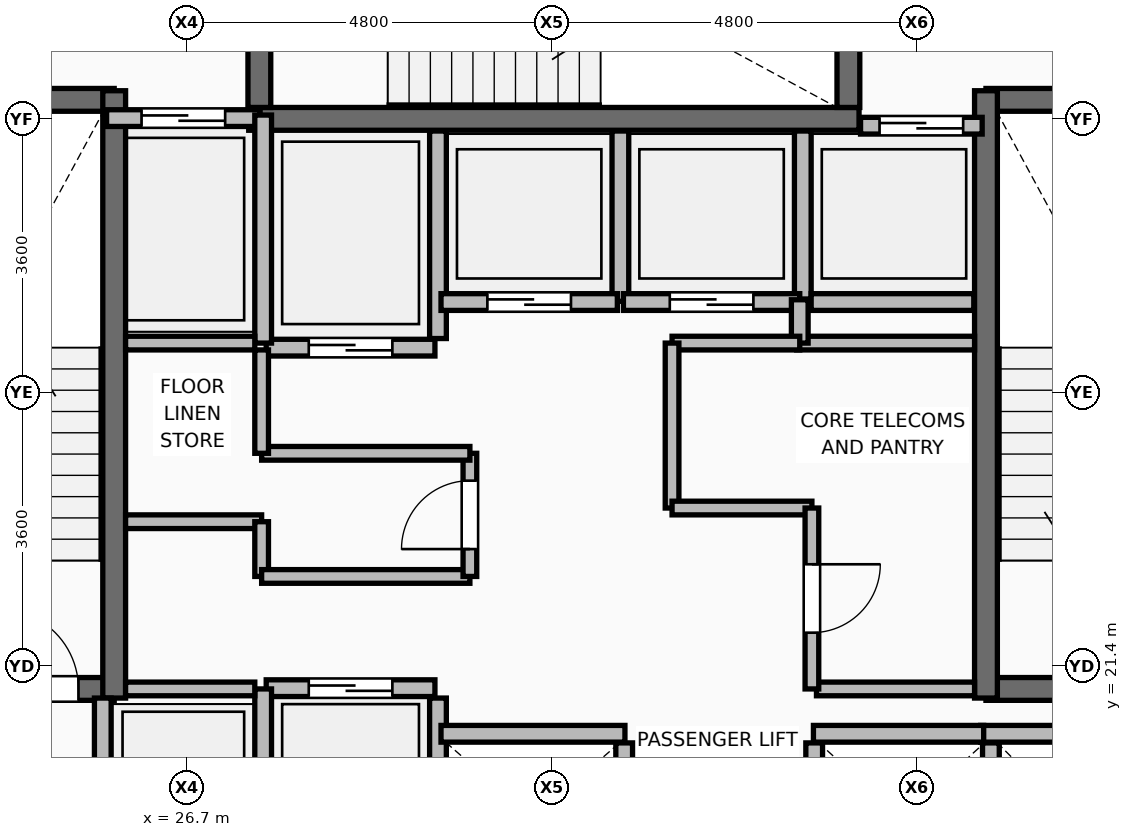
"""IFC4 building model, lengths in metres.
Left out: names, types, materials, properties, quantities, classifications, styles, units other than length and angle.
Written with IfcOpenShell. Run it as: python <this file> out.ifc"""

import sys

from ifc_helpers import new_model, si_unit, direction, frame, frame_2d, origin, place, context, subcontext, project, spatial, rectangle, extrude, element, fill, save


model = new_model("IFC4")
c1 = context("Model", 3, precision=1e-05, world=origin(), true_north=direction((0.0, 1.0)))
c2 = subcontext(c1, "Body", "Model", "MODEL_VIEW")
j1 = project(units=[si_unit("LENGTHUNIT", "METRE"), si_unit("PLANEANGLEUNIT", "RADIAN")], contexts=[c1])
p1 = place(None, origin())
s1 = spatial("IfcSite", under=j1, at=p1, CompositionType="ELEMENT")
p2 = place(p1, origin())
s2 = spatial("IfcBuilding", under=s1, at=p2, CompositionType="ELEMENT")
p3 = place(p2, frame((0.0, 0.0, 278.85)))
s3 = spatial("IfcBuildingStorey", under=s2, at=p3, CompositionType="ELEMENT", Elevation=278.85)
p4 = place(p3, frame((30.0, 18.08, 0.0), z_axis=(0.0, 0.0, 1.0), x_axis=(0.0, 1.0, 0.0)))
e1 = element("IfcWall", 1, at=p4, inside=s3, PredefinedType="PARTITIONING", context=c2, shape_type="SweptSolid", body=[
    extrude(rectangle(XDim=2.9, YDim=0.22, at=frame_2d((1.45, 0.0))), origin(), (0.0, 0.0, 1.0), 3.545),
])
for number, where, z_axis, x_axis in (
    (2, (32.45, 17.92, 0.0), (0.0, 0.0, 1.0), (0.0, 1.0, 0.0)),
    (3, (34.95, 17.92, 0.0), (0.0, 0.0, 1.0), (0.0, 1.0, 0.0)),
):
    element("IfcWall", number, at=place(p3, frame(where, z_axis=z_axis, x_axis=x_axis)), inside=s3, PredefinedType="PARTITIONING", context=c2, shape_type="SweptSolid", body=[
        extrude(rectangle(XDim=2.47, YDim=0.22, at=frame_2d((1.235, 0.0))), origin(), (0.0, 0.0, 1.0), 3.545),
    ])
p5 = place(p3, frame((37.275, 18.08, 0.0), z_axis=(0.0, 0.0, 1.0), x_axis=(0.0, 1.0, 0.0)))
e4 = element("IfcWall", 4, at=p5, inside=s3, PredefinedType="PARTITIONING", context=c2, shape_type="SweptSolid", body=[
    extrude(rectangle(XDim=2.31, YDim=0.22, at=frame_2d((1.155, 0.0))), origin(), (0.0, 0.0, 1.0), 3.545),
])
p6 = place(p3, frame((30.0, 25.71, 0.0), z_axis=(0.0, 0.0, 1.0), x_axis=(0.0, 1.0, 0.0)))
e5 = element("IfcWall", 5, at=p6, inside=s3, PredefinedType="PARTITIONING", context=c2, shape_type="SweptSolid", body=[
    extrude(rectangle(XDim=2.73, YDim=0.22, at=frame_2d((1.365, 0.0))), origin(), (0.0, 0.0, 1.0), 3.545),
])
p7 = place(p3, frame((32.4, 26.2, 0.0), z_axis=(0.0, 0.0, 1.0), x_axis=(0.0, 1.0, 0.0)))
e6 = element("IfcWall", 6, at=p7, inside=s3, PredefinedType="PARTITIONING", context=c2, shape_type="SweptSolid", body=[
    extrude(rectangle(XDim=2.24, YDim=0.22, at=frame_2d((1.12, 0.0))), origin(), (0.0, 0.0, 1.0), 3.545),
])
p8 = place(p3, frame((34.8, 26.23, 0.0), z_axis=(0.0, 0.0, 1.0), x_axis=(0.0, 1.0, 0.0)))
e7 = element("IfcWall", 7, at=p8, inside=s3, PredefinedType="PARTITIONING", context=c2, shape_type="SweptSolid", body=[
    extrude(rectangle(XDim=2.21, YDim=0.22, at=frame_2d((1.105, 0.0))), origin(), (0.0, 0.0, 1.0), 3.545),
])
p9 = place(p3, frame((34.91, 26.19, 0.0), z_axis=(0.0, 0.0, 1.0), x_axis=(1.0, 0.0, 0.0)))
e8 = element("IfcWall", 8, at=p9, inside=s3, PredefinedType="PARTITIONING", context=c2, shape_type="SweptSolid", body=[
    extrude(rectangle(XDim=2.14, YDim=0.22, at=frame_2d((1.07, 0.0))), origin(), (0.0, 0.0, 1.0), 3.545),
])
p10 = place(p3, frame((22.075, 21.1, 0.0), z_axis=(0.0, 0.0, 1.0), x_axis=(1.0, 0.0, 0.0)))
e9 = element("IfcWall", 9, at=p10, inside=s3, PredefinedType="SHEAR", context=c2, shape_type="SweptSolid", body=[
    extrude(rectangle(XDim=3.665, YDim=0.3, at=frame_2d((1.833, 0.0))), origin(), (0.0, 0.0, 1.0), 3.57),
])
p11 = place(p10, frame((2.145, 0.0, 0.0)))
e10 = element("IfcOpeningElement", 10, at=p11, cuts=e9, PredefinedType="OPENING", context=c2, shape_type="SweptSolid", body=[
    extrude(rectangle(XDim=1.05, YDim=2.1, at=frame_2d((0.525, 1.05))), frame((0.0, 0.16, 0.0), z_axis=(0.0, -1.0, 0.0), x_axis=(1.0, 0.0, 0.0)), (0.0, 0.0, 1.0), 0.32),
])
p12 = place(p3, frame((22.075, 28.85, 0.0), z_axis=(0.0, 0.0, 1.0), x_axis=(1.0, 0.0, 0.0)))
e11 = element("IfcWall", 11, at=p12, inside=s3, PredefinedType="SHEAR", context=c2, shape_type="SweptSolid", body=[
    extrude(rectangle(XDim=3.665, YDim=0.3, at=frame_2d((1.833, 0.0))), origin(), (0.0, 0.0, 1.0), 3.57),
])
p13 = place(p3, frame((25.74, 20.98, 0.0), z_axis=(0.0, 0.0, 1.0), x_axis=(0.0, 1.0, 0.0)))
e12 = element("IfcWall", 12, at=p13, inside=s3, PredefinedType="SHEAR", context=c2, shape_type="SweptSolid", body=[
    extrude(rectangle(XDim=7.99, YDim=0.3, at=frame_2d((3.995, 0.0))), origin(), (0.0, 0.0, 1.0), 3.57),
])
for number, where, z_axis, x_axis in (
    (13, (37.21, 21.1, 0.0), (0.0, 0.0, 1.0), (1.0, 0.0, 0.0)),
    (14, (37.21, 28.85, 0.0), (0.0, 0.0, 1.0), (1.0, 0.0, 0.0)),
):
    element("IfcWall", number, at=place(p3, frame(where, z_axis=z_axis, x_axis=x_axis)), inside=s3, PredefinedType="SHEAR", context=c2, shape_type="SweptSolid", body=[
        extrude(rectangle(XDim=3.715, YDim=0.3, at=frame_2d((1.857, 0.0))), origin(), (0.0, 0.0, 1.0), 3.57),
    ])
p14 = place(p3, frame((37.21, 20.98, 0.0), z_axis=(0.0, 0.0, 1.0), x_axis=(0.0, 1.0, 0.0)))
e15 = element("IfcWall", 15, at=p14, inside=s3, PredefinedType="SHEAR", context=c2, shape_type="SweptSolid", body=[
    extrude(rectangle(XDim=7.99, YDim=0.3, at=frame_2d((3.995, 0.0))), origin(), (0.0, 0.0, 1.0), 3.57),
])
p15 = place(p3, frame((27.51, 28.6, 0.0), z_axis=(0.0, 0.0, 1.0), x_axis=(1.0, 0.0, 0.0)))
e16 = element("IfcWall", 16, at=p15, inside=s3, PredefinedType="SHEAR", context=c2, shape_type="SweptSolid", body=[
    extrude(rectangle(XDim=8.03, YDim=0.3, at=frame_2d((4.015, 0.0))), origin(), (0.0, 0.0, 1.0), 3.57),
])
p16 = place(p3, frame((27.65, 28.75, 0.0), z_axis=(0.0, 0.0, 1.0), x_axis=(0.0, 1.0, 0.0)))
e17 = element("IfcWall", 17, at=p16, inside=s3, PredefinedType="SHEAR", context=c2, shape_type="SweptSolid", body=[
    extrude(rectangle(XDim=3.525, YDim=0.3, at=frame_2d((1.762, 0.0))), origin(), (0.0, 0.0, 1.0), 3.57),
])
p17 = place(p16, frame((1.0, 0.0, 0.0)))
e18 = element("IfcOpeningElement", 18, at=p17, cuts=e17, PredefinedType="OPENING", context=c2, shape_type="SweptSolid", body=[
    extrude(rectangle(XDim=1.05, YDim=2.1, at=frame_2d((0.525, 1.05))), frame((0.0, 0.16, 0.0), z_axis=(0.0, -1.0, 0.0), x_axis=(1.0, 0.0, 0.0)), (0.0, 0.0, 1.0), 0.32),
])
p18 = place(p3, frame((35.4, 28.75, 0.0), z_axis=(0.0, 0.0, 1.0), x_axis=(0.0, 1.0, 0.0)))
e19 = element("IfcWall", 19, at=p18, inside=s3, PredefinedType="SHEAR", context=c2, shape_type="SweptSolid", body=[
    extrude(rectangle(XDim=3.525, YDim=0.3, at=frame_2d((1.762, 0.0))), origin(), (0.0, 0.0, 1.0), 3.57),
])
p19 = place(p3, frame((25.59, 18.22, 0.0), z_axis=(0.0, 0.0, 1.0), x_axis=(0.0, 1.0, 0.0)))
e20 = element("IfcWall", 20, at=p19, inside=s3, PredefinedType="PARTITIONING", context=c2, shape_type="SweptSolid", body=[
    extrude(rectangle(XDim=2.76, YDim=0.22, at=frame_2d((1.38, 0.0))), origin(), (0.0, 0.0, 1.0), 3.55),
])
p20 = place(p19, frame((0.83, 0.0, 0.0)))
e21 = element("IfcOpeningElement", 21, at=p20, cuts=e20, PredefinedType="OPENING", context=c2, shape_type="SweptSolid", body=[
    extrude(rectangle(XDim=1.1, YDim=2.2, at=frame_2d((0.55, 1.1))), frame((0.0, 0.12, 0.0), z_axis=(0.0, -1.0, 0.0), x_axis=(1.0, 0.0, 0.0)), (0.0, 0.0, 1.0), 0.24),
])
p21 = place(p3, frame((25.64, 28.61, 0.0), z_axis=(0.0, 0.0, 1.0), x_axis=(1.0, 0.0, 0.0)))
e22 = element("IfcWall", 22, at=p21, inside=s3, PredefinedType="PARTITIONING", context=c2, shape_type="SweptSolid", body=[
    extrude(rectangle(XDim=2.02, YDim=0.22, at=frame_2d((1.01, 0.0))), origin(), (0.0, 0.0, 1.0), 3.55),
])
p22 = place(p21, frame((0.46, 0.0, 0.0)))
e23 = element("IfcOpeningElement", 23, at=p22, cuts=e22, PredefinedType="OPENING", context=c2, shape_type="SweptSolid", body=[
    extrude(rectangle(XDim=1.1, YDim=2.2, at=frame_2d((0.55, 1.1))), frame((0.0, 0.12, 0.0), z_axis=(0.0, -1.0, 0.0), x_axis=(1.0, 0.0, 0.0)), (0.0, 0.0, 1.0), 0.24),
])
p23 = place(p3, frame((27.74, 21.11, 0.0), z_axis=(0.0, 0.0, 1.0), x_axis=(1.0, 0.0, 0.0)))
e24 = element("IfcWall", 24, at=p23, inside=s3, PredefinedType="PARTITIONING", context=c2, shape_type="SweptSolid", body=[
    extrude(rectangle(XDim=2.22, YDim=0.22, at=frame_2d((1.11, 0.0))), origin(), (0.0, 0.0, 1.0), 3.55),
])
p24 = place(p23, frame((0.56, 0.0, 0.0)))
e25 = element("IfcOpeningElement", 25, at=p24, cuts=e24, PredefinedType="OPENING", context=c2, shape_type="SweptSolid", body=[
    extrude(rectangle(XDim=1.1, YDim=2.2, at=frame_2d((0.55, 1.1))), frame((0.0, 0.12, 0.0), z_axis=(0.0, -1.0, 0.0), x_axis=(1.0, 0.0, 0.0)), (0.0, 0.0, 1.0), 0.24),
])
p25 = place(p3, frame((27.74, 25.59, 0.0), z_axis=(0.0, 0.0, 1.0), x_axis=(1.0, 0.0, 0.0)))
e26 = element("IfcWall", 26, at=p25, inside=s3, PredefinedType="PARTITIONING", context=c2, shape_type="SweptSolid", body=[
    extrude(rectangle(XDim=2.22, YDim=0.22, at=frame_2d((1.11, 0.0))), origin(), (0.0, 0.0, 1.0), 3.55),
])
p26 = place(p25, frame((0.56, 0.0, 0.0)))
e27 = element("IfcOpeningElement", 27, at=p26, cuts=e26, PredefinedType="OPENING", context=c2, shape_type="SweptSolid", body=[
    extrude(rectangle(XDim=1.1, YDim=2.2, at=frame_2d((0.55, 1.1))), frame((0.0, 0.12, 0.0), z_axis=(0.0, -1.0, 0.0), x_axis=(1.0, 0.0, 0.0)), (0.0, 0.0, 1.0), 0.24),
])
p27 = place(p3, frame((30.04, 20.51, 0.0), z_axis=(0.0, 0.0, 1.0), x_axis=(1.0, 0.0, 0.0)))
e28 = element("IfcWall", 28, at=p27, inside=s3, PredefinedType="PARTITIONING", context=c2, shape_type="SweptSolid", body=[
    extrude(rectangle(XDim=2.42, YDim=0.22, at=frame_2d((1.21, 0.0))), origin(), (0.0, 0.0, 1.0), 3.55),
])
for number, where, z_axis, x_axis in (
    (29, (37.14, 20.51, 0.0), (0.0, 0.0, 1.0), (1.0, 0.0, 0.0)),
    (30, (34.94, 20.51, 0.0), (0.0, 0.0, 1.0), (1.0, 0.0, 0.0)),
):
    element("IfcWall", number, at=place(p3, frame(where, z_axis=z_axis, x_axis=x_axis)), inside=s3, PredefinedType="PARTITIONING", context=c2, shape_type="SweptSolid", body=[
        extrude(rectangle(XDim=2.24, YDim=0.22, at=frame_2d((1.12, 0.0))), origin(), (0.0, 0.0, 1.0), 3.55),
    ])
p28 = place(p3, frame((30.04, 26.19, 0.0), z_axis=(0.0, 0.0, 1.0), x_axis=(1.0, 0.0, 0.0)))
e31 = element("IfcWall", 31, at=p28, inside=s3, PredefinedType="PARTITIONING", context=c2, shape_type="SweptSolid", body=[
    extrude(rectangle(XDim=2.32, YDim=0.22, at=frame_2d((1.16, 0.0))), origin(), (0.0, 0.0, 1.0), 3.55),
])
p29 = place(p28, frame((0.61, 0.0, 0.0)))
e32 = element("IfcOpeningElement", 32, at=p29, cuts=e31, PredefinedType="OPENING", context=c2, shape_type="SweptSolid", body=[
    extrude(rectangle(XDim=1.1, YDim=2.2, at=frame_2d((0.55, 1.1))), frame((0.0, 0.12, 0.0), z_axis=(0.0, -1.0, 0.0), x_axis=(1.0, 0.0, 0.0)), (0.0, 0.0, 1.0), 0.24),
])
p30 = place(p3, frame((32.44, 26.19, 0.0), z_axis=(0.0, 0.0, 1.0), x_axis=(1.0, 0.0, 0.0)))
e33 = element("IfcWall", 33, at=p30, inside=s3, PredefinedType="PARTITIONING", context=c2, shape_type="SweptSolid", body=[
    extrude(rectangle(XDim=2.32, YDim=0.22, at=frame_2d((1.16, 0.0))), origin(), (0.0, 0.0, 1.0), 3.55),
])
p31 = place(p30, frame((0.61, 0.0, 0.0)))
e34 = element("IfcOpeningElement", 34, at=p31, cuts=e33, PredefinedType="OPENING", context=c2, shape_type="SweptSolid", body=[
    extrude(rectangle(XDim=1.1, YDim=2.2, at=frame_2d((0.55, 1.1))), frame((0.0, 0.12, 0.0), z_axis=(0.0, -1.0, 0.0), x_axis=(1.0, 0.0, 0.0)), (0.0, 0.0, 1.0), 0.24),
])
p32 = place(p3, frame((35.56, 28.51, 0.0), z_axis=(0.0, 0.0, 1.0), x_axis=(1.0, 0.0, 0.0)))
e35 = element("IfcWall", 35, at=p32, inside=s3, PredefinedType="PARTITIONING", context=c2, shape_type="SweptSolid", body=[
    extrude(rectangle(XDim=1.6, YDim=0.22, at=frame_2d((0.8, 0.0))), origin(), (0.0, 0.0, 1.0), 3.55),
])
p33 = place(p32, frame((0.25, 0.0, 0.0)))
e36 = element("IfcOpeningElement", 36, at=p33, cuts=e35, PredefinedType="OPENING", context=c2, shape_type="SweptSolid", body=[
    extrude(rectangle(XDim=1.1, YDim=2.2, at=frame_2d((0.55, 1.1))), frame((0.0, 0.12, 0.0), z_axis=(0.0, -1.0, 0.0), x_axis=(1.0, 0.0, 0.0)), (0.0, 0.0, 1.0), 0.24),
])
p34 = place(p3, frame((27.7, 18.15, 0.0), z_axis=(0.0, 0.0, 1.0), x_axis=(0.0, 1.0, 0.0)))
e37 = element("IfcWall", 37, at=p34, inside=s3, PredefinedType="PARTITIONING", context=c2, shape_type="SweptSolid", body=[
    extrude(rectangle(XDim=2.95, YDim=0.22, at=frame_2d((1.475, 0.0))), origin(), (0.0, 0.0, 1.0), 3.55),
])
p35 = place(p3, frame((27.7, 25.65, 0.0), z_axis=(0.0, 0.0, 1.0), x_axis=(0.0, 1.0, 0.0)))
e38 = element("IfcWall", 38, at=p35, inside=s3, PredefinedType="PARTITIONING", context=c2, shape_type="SweptSolid", body=[
    extrude(rectangle(XDim=3.0, YDim=0.22, at=frame_2d((1.5, 0.0))), origin(), (0.0, 0.0, 1.0), 3.55),
])
for number, where, z_axis, x_axis in (
    (39, (25.89, 21.1, 0.0), (0.0, 0.0, 1.0), (1.0, 0.0, 0.0)),
    (40, (25.89, 25.65, 0.0), (0.0, 0.0, 1.0), (1.0, 0.0, 0.0)),
):
    element("IfcWall", number, at=place(p3, frame(where, z_axis=z_axis, x_axis=x_axis)), inside=s3, PredefinedType="PARTITIONING", context=c2, shape_type="SweptSolid", body=[
        extrude(rectangle(XDim=1.7, YDim=0.18, at=frame_2d((0.85, 0.0))), origin(), (0.0, 0.0, 1.0), 3.55),
    ])
p36 = place(p3, frame((25.89, 23.3, 0.0), z_axis=(0.0, 0.0, 1.0), x_axis=(1.0, 0.0, 0.0)))
e41 = element("IfcWall", 41, at=p36, inside=s3, PredefinedType="PARTITIONING", context=c2, shape_type="SweptSolid", body=[
    extrude(rectangle(XDim=1.79, YDim=0.18, at=frame_2d((0.895, 0.0))), origin(), (0.0, 0.0, 1.0), 3.55),
])
p37 = place(p3, frame((27.68, 22.58, 0.0), z_axis=(0.0, 0.0, 1.0), x_axis=(0.0, 1.0, 0.0)))
e42 = element("IfcWall", 42, at=p37, inside=s3, PredefinedType="PARTITIONING", context=c2, shape_type="SweptSolid", body=[
    extrude(rectangle(XDim=0.72, YDim=0.18, at=frame_2d((0.36, 0.0))), origin(), (0.0, 0.0, 1.0), 3.55),
])
p38 = place(p3, frame((27.68, 22.58, 0.0), z_axis=(0.0, 0.0, 1.0), x_axis=(1.0, 0.0, 0.0)))
e43 = element("IfcWall", 43, at=p38, inside=s3, PredefinedType="PARTITIONING", context=c2, shape_type="SweptSolid", body=[
    extrude(rectangle(XDim=2.74, YDim=0.18, at=frame_2d((1.37, 0.0))), origin(), (0.0, 0.0, 1.0), 3.55),
])
p39 = place(p3, frame((30.42, 22.58, 0.0), z_axis=(0.0, 0.0, 1.0), x_axis=(0.0, 1.0, 0.0)))
e44 = element("IfcWall", 44, at=p39, inside=s3, PredefinedType="PARTITIONING", context=c2, shape_type="SweptSolid", body=[
    extrude(rectangle(XDim=1.62, YDim=0.18, at=frame_2d((0.81, 0.0))), origin(), (0.0, 0.0, 1.0), 3.55),
])
p40 = place(p39, frame((0.36, 0.0, 0.0)))
e45 = element("IfcOpeningElement", 45, at=p40, cuts=e44, PredefinedType="OPENING", context=c2, shape_type="SweptSolid", body=[
    extrude(rectangle(XDim=0.9, YDim=2.1, at=frame_2d((0.45, 1.05))), frame((0.0, 0.1, 0.0), z_axis=(0.0, -1.0, 0.0), x_axis=(1.0, 0.0, 0.0)), (0.0, 0.0, 1.0), 0.2),
])
p41 = place(p3, frame((27.68, 24.2, 0.0), z_axis=(0.0, 0.0, 1.0), x_axis=(1.0, 0.0, 0.0)))
e46 = element("IfcWall", 46, at=p41, inside=s3, PredefinedType="PARTITIONING", context=c2, shape_type="SweptSolid", body=[
    extrude(rectangle(XDim=2.74, YDim=0.18, at=frame_2d((1.37, 0.0))), origin(), (0.0, 0.0, 1.0), 3.55),
])
p42 = place(p3, frame((27.68, 24.2, 0.0), z_axis=(0.0, 0.0, 1.0), x_axis=(0.0, 1.0, 0.0)))
e47 = element("IfcWall", 47, at=p42, inside=s3, PredefinedType="PARTITIONING", context=c2, shape_type="SweptSolid", body=[
    extrude(rectangle(XDim=1.36, YDim=0.18, at=frame_2d((0.68, 0.0))), origin(), (0.0, 0.0, 1.0), 3.55),
])
p43 = place(p3, frame((34.98, 21.1, 0.0), z_axis=(0.0, 0.0, 1.0), x_axis=(1.0, 0.0, 0.0)))
e48 = element("IfcWall", 48, at=p43, inside=s3, PredefinedType="PARTITIONING", context=c2, shape_type="SweptSolid", body=[
    extrude(rectangle(XDim=2.08, YDim=0.18, at=frame_2d((1.04, 0.0))), origin(), (0.0, 0.0, 1.0), 3.55),
])
p44 = place(p3, frame((34.72, 25.65, 0.0), z_axis=(0.0, 0.0, 1.0), x_axis=(1.0, 0.0, 0.0)))
e49 = element("IfcWall", 49, at=p44, inside=s3, PredefinedType="PARTITIONING", context=c2, shape_type="SweptSolid", body=[
    extrude(rectangle(XDim=2.34, YDim=0.18, at=frame_2d((1.17, 0.0))), origin(), (0.0, 0.0, 1.0), 3.55),
])
p45 = place(p3, frame((34.76, 25.65, 0.0), z_axis=(0.0, 0.0, 1.0), x_axis=(0.0, 1.0, 0.0)))
e50 = element("IfcWall", 50, at=p45, inside=s3, PredefinedType="PARTITIONING", context=c2, shape_type="SweptSolid", body=[
    extrude(rectangle(XDim=0.57, YDim=0.22, at=frame_2d((0.285, 0.0))), origin(), (0.0, 0.0, 1.0), 3.55),
])
p46 = place(p3, frame((33.08, 25.65, 0.0), z_axis=(0.0, 0.0, 1.0), x_axis=(1.0, 0.0, 0.0)))
e51 = element("IfcWall", 51, at=p46, inside=s3, PredefinedType="PARTITIONING", context=c2, shape_type="SweptSolid", body=[
    extrude(rectangle(XDim=1.68, YDim=0.18, at=frame_2d((0.84, 0.0))), origin(), (0.0, 0.0, 1.0), 3.55),
])
p47 = place(p3, frame((33.08, 23.48, 0.0), z_axis=(0.0, 0.0, 1.0), x_axis=(0.0, 1.0, 0.0)))
e52 = element("IfcWall", 52, at=p47, inside=s3, PredefinedType="PARTITIONING", context=c2, shape_type="SweptSolid", body=[
    extrude(rectangle(XDim=2.17, YDim=0.18, at=frame_2d((1.085, 0.0))), origin(), (0.0, 0.0, 1.0), 3.55),
])
p48 = place(p3, frame((33.08, 23.48, 0.0), z_axis=(0.0, 0.0, 1.0), x_axis=(1.0, 0.0, 0.0)))
e53 = element("IfcWall", 53, at=p48, inside=s3, PredefinedType="PARTITIONING", context=c2, shape_type="SweptSolid", body=[
    extrude(rectangle(XDim=1.84, YDim=0.18, at=frame_2d((0.92, 0.0))), origin(), (0.0, 0.0, 1.0), 3.55),
])
p49 = place(p3, frame((34.92, 21.1, 0.0), z_axis=(0.0, 0.0, 1.0), x_axis=(0.0, 1.0, 0.0)))
e54 = element("IfcWall", 54, at=p49, inside=s3, PredefinedType="PARTITIONING", context=c2, shape_type="SweptSolid", body=[
    extrude(rectangle(XDim=2.38, YDim=0.18, at=frame_2d((1.19, 0.0))), origin(), (0.0, 0.0, 1.0), 3.55),
])
p50 = place(p49, frame((0.74, 0.0, 0.0)))
e55 = element("IfcOpeningElement", 55, at=p50, cuts=e54, PredefinedType="OPENING", context=c2, shape_type="SweptSolid", body=[
    extrude(rectangle(XDim=0.9, YDim=2.1, at=frame_2d((0.45, 1.05))), frame((0.0, 0.1, 0.0), z_axis=(0.0, -1.0, 0.0), x_axis=(1.0, 0.0, 0.0)), (0.0, 0.0, 1.0), 0.2),
])
p51 = place(p11, origin())
e56 = element("IfcDoor", 56, at=p51, inside=s3, OperationType="SINGLE_SWING_LEFT", PredefinedType="DOOR", context=c2, shape_type="SweptSolid", body=[
    extrude(rectangle(XDim=1.05, YDim=2.1, at=frame_2d((0.525, 1.05))), frame((0.0, 0.025, 0.0), z_axis=(0.0, -1.0, 0.0), x_axis=(1.0, 0.0, 0.0)), (0.0, 0.0, 1.0), 0.05),
])
fill(e10, e56)
p52 = place(p22, origin())
e57 = element("IfcDoor", 57, at=p52, inside=s3, OperationType="DOUBLE_DOOR_SLIDING", PredefinedType="DOOR", context=c2, shape_type="SweptSolid", body=[
    extrude(rectangle(XDim=1.1, YDim=2.2, at=frame_2d((0.55, 1.1))), frame((0.0, 0.025, 0.0), z_axis=(0.0, -1.0, 0.0), x_axis=(1.0, 0.0, 0.0)), (0.0, 0.0, 1.0), 0.05),
])
fill(e23, e57)
p53 = place(p24, origin())
e58 = element("IfcDoor", 58, at=p53, inside=s3, OperationType="DOUBLE_DOOR_SLIDING", PredefinedType="DOOR", context=c2, shape_type="SweptSolid", body=[
    extrude(rectangle(XDim=1.1, YDim=2.2, at=frame_2d((0.55, 1.1))), frame((0.0, 0.025, 0.0), z_axis=(0.0, -1.0, 0.0), x_axis=(1.0, 0.0, 0.0)), (0.0, 0.0, 1.0), 0.05),
])
fill(e25, e58)
p54 = place(p26, frame((1.1, 0.0, 0.0), z_axis=(0.0, 0.0, 1.0), x_axis=(-1.0, 0.0, 0.0)))
e59 = element("IfcDoor", 59, at=p54, inside=s3, OperationType="DOUBLE_DOOR_SLIDING", PredefinedType="DOOR", context=c2, shape_type="SweptSolid", body=[
    extrude(rectangle(XDim=1.1, YDim=2.2, at=frame_2d((0.55, 1.1))), frame((0.0, 0.025, 0.0), z_axis=(0.0, -1.0, 0.0), x_axis=(1.0, 0.0, 0.0)), (0.0, 0.0, 1.0), 0.05),
])
fill(e27, e59)
p55 = place(p29, frame((1.1, 0.0, 0.0), z_axis=(0.0, 0.0, 1.0), x_axis=(-1.0, 0.0, 0.0)))
e60 = element("IfcDoor", 60, at=p55, inside=s3, OperationType="DOUBLE_DOOR_SLIDING", PredefinedType="DOOR", context=c2, shape_type="SweptSolid", body=[
    extrude(rectangle(XDim=1.1, YDim=2.2, at=frame_2d((0.55, 1.1))), frame((0.0, 0.025, 0.0), z_axis=(0.0, -1.0, 0.0), x_axis=(1.0, 0.0, 0.0)), (0.0, 0.0, 1.0), 0.05),
])
fill(e32, e60)
p56 = place(p31, frame((1.1, 0.0, 0.0), z_axis=(0.0, 0.0, 1.0), x_axis=(-1.0, 0.0, 0.0)))
e61 = element("IfcDoor", 61, at=p56, inside=s3, OperationType="DOUBLE_DOOR_SLIDING", PredefinedType="DOOR", context=c2, shape_type="SweptSolid", body=[
    extrude(rectangle(XDim=1.1, YDim=2.2, at=frame_2d((0.55, 1.1))), frame((0.0, 0.025, 0.0), z_axis=(0.0, -1.0, 0.0), x_axis=(1.0, 0.0, 0.0)), (0.0, 0.0, 1.0), 0.05),
])
fill(e34, e61)
p57 = place(p33, origin())
e62 = element("IfcDoor", 62, at=p57, inside=s3, OperationType="DOUBLE_DOOR_SLIDING", PredefinedType="DOOR", context=c2, shape_type="SweptSolid", body=[
    extrude(rectangle(XDim=1.1, YDim=2.2, at=frame_2d((0.55, 1.1))), frame((0.0, 0.025, 0.0), z_axis=(0.0, -1.0, 0.0), x_axis=(1.0, 0.0, 0.0)), (0.0, 0.0, 1.0), 0.05),
])
fill(e36, e62)
p58 = place(p40, origin())
e63 = element("IfcDoor", 63, at=p58, inside=s3, OperationType="SINGLE_SWING_LEFT", PredefinedType="DOOR", context=c2, shape_type="SweptSolid", body=[
    extrude(rectangle(XDim=0.9, YDim=2.1, at=frame_2d((0.45, 1.05))), frame((0.0, 0.025, 0.0), z_axis=(0.0, -1.0, 0.0), x_axis=(1.0, 0.0, 0.0)), (0.0, 0.0, 1.0), 0.05),
])
fill(e45, e63)
p59 = place(p50, frame((0.9, 0.0, 0.0), z_axis=(0.0, 0.0, 1.0), x_axis=(-1.0, 0.0, 0.0)))
e64 = element("IfcDoor", 64, at=p59, inside=s3, OperationType="SINGLE_SWING_LEFT", PredefinedType="DOOR", context=c2, shape_type="SweptSolid", body=[
    extrude(rectangle(XDim=0.9, YDim=2.1, at=frame_2d((0.45, 1.05))), frame((0.0, 0.025, 0.0), z_axis=(0.0, -1.0, 0.0), x_axis=(1.0, 0.0, 0.0)), (0.0, 0.0, 1.0), 0.05),
])
fill(e55, e64)
save(model, sys.argv[1])
